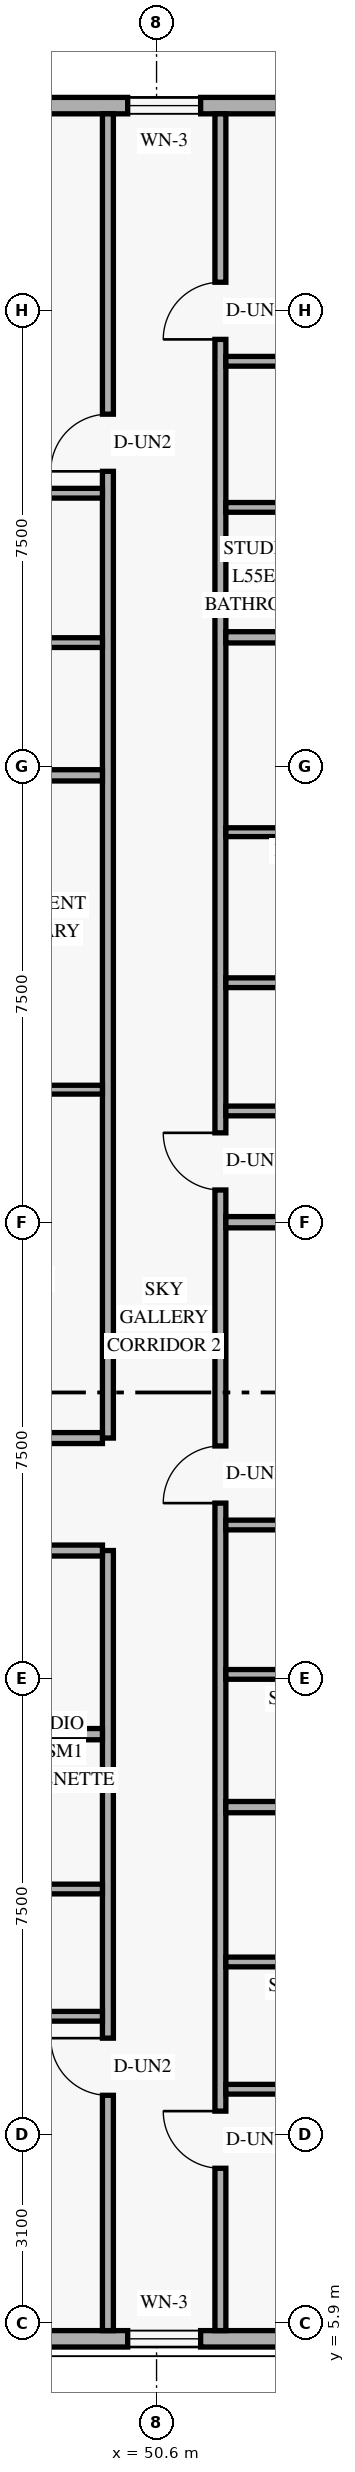
"""IFC4 building model, lengths in metres.
Left out: names, types, materials, properties, quantities, classifications, styles, units other than length and angle.
Written with IfcOpenShell. Run it as: python <this file> out.ifc"""

import sys

from ifc_helpers import new_model, si_unit, direction, frame, frame_2d, origin, place, context, subcontext, project, spatial, rectangle, extrude, element, fill, save


model = new_model("IFC4")
c1 = context("Model", 3, precision=1e-05, world=origin(), true_north=direction((0.0, 1.0)))
c2 = subcontext(c1, "Body", "Model", "MODEL_VIEW")
j1 = project(units=[si_unit("LENGTHUNIT", "METRE"), si_unit("PLANEANGLEUNIT", "RADIAN")], contexts=[c1])
p1 = place(None, origin())
s1 = spatial("IfcSite", under=j1, at=p1, CompositionType="ELEMENT")
p2 = place(p1, origin())
s2 = spatial("IfcBuilding", under=s1, at=p2, CompositionType="ELEMENT")
p3 = place(p2, frame((0.0, 0.0, 213.0)))
s3 = spatial("IfcBuildingStorey", under=s2, at=p3, CompositionType="ELEMENT", Elevation=213.0)
p4 = place(p3, frame((25.82, 5.635, 0.0), z_axis=(0.0, 0.0, 1.0), x_axis=(1.0, 0.0, 0.0)))
e1 = element("IfcWall", 1, at=p4, inside=s3, PredefinedType="SOLIDWALL", context=c2, shape_type="SweptSolid", body=[
    extrude(rectangle(XDim=32.96, YDim=0.27, at=frame_2d((16.48, 0.0))), origin(), (0.0, 0.0, 1.0), 3.36),
])
p5 = place(p4, frame((3.57, 0.0, 0.85)))
e2 = element("IfcOpeningElement", 2, at=p5, cuts=e1, PredefinedType="OPENING", context=c2, shape_type="SweptSolid", body=[
    extrude(rectangle(XDim=1.8, YDim=1.6, at=frame_2d((0.9, 0.8))), frame((0.0, 0.145, 0.0), z_axis=(0.0, -1.0, 0.0), x_axis=(1.0, 0.0, 0.0)), (0.0, 0.0, 1.0), 0.29),
])
p6 = place(p4, frame((18.725, 0.0, 0.85)))
e3 = element("IfcOpeningElement", 3, at=p6, cuts=e1, PredefinedType="OPENING", context=c2, shape_type="SweptSolid", body=[
    extrude(rectangle(XDim=1.8, YDim=1.6, at=frame_2d((0.9, 0.8))), frame((0.0, 0.145, 0.0), z_axis=(0.0, -1.0, 0.0), x_axis=(1.0, 0.0, 0.0)), (0.0, 0.0, 1.0), 0.29),
])
p7 = place(p4, frame((24.305, 0.0, 0.85)))
e4 = element("IfcOpeningElement", 4, at=p7, cuts=e1, PredefinedType="OPENING", context=c2, shape_type="SweptSolid", body=[
    extrude(rectangle(XDim=1.2, YDim=1.5, at=frame_2d((0.6, 0.75))), frame((0.0, 0.145, 0.0), z_axis=(0.0, -1.0, 0.0), x_axis=(1.0, 0.0, 0.0)), (0.0, 0.0, 1.0), 0.29),
])
p8 = place(p4, frame((30.448, 0.0, 0.85)))
e5 = element("IfcOpeningElement", 5, at=p8, cuts=e1, PredefinedType="OPENING", context=c2, shape_type="SweptSolid", body=[
    extrude(rectangle(XDim=1.8, YDim=1.6, at=frame_2d((0.9, 0.8))), frame((0.0, 0.145, 0.0), z_axis=(0.0, -1.0, 0.0), x_axis=(1.0, 0.0, 0.0)), (0.0, 0.0, 1.0), 0.29),
])
p9 = place(p3, frame((58.78, 42.365, 0.0), z_axis=(0.0, 0.0, 1.0), x_axis=(-1.0, 0.0, 0.0)))
e6 = element("IfcWall", 6, at=p9, inside=s3, PredefinedType="SOLIDWALL", context=c2, shape_type="SweptSolid", body=[
    extrude(rectangle(XDim=32.96, YDim=0.27, at=frame_2d((16.48, 0.0))), origin(), (0.0, 0.0, 1.0), 3.36),
])
p10 = place(p9, frame((27.59, 0.0, 0.85)))
e7 = element("IfcOpeningElement", 7, at=p10, cuts=e6, PredefinedType="OPENING", context=c2, shape_type="SweptSolid", body=[
    extrude(rectangle(XDim=1.8, YDim=1.6, at=frame_2d((0.9, 0.8))), frame((0.0, 0.145, 0.0), z_axis=(0.0, -1.0, 0.0), x_axis=(1.0, 0.0, 0.0)), (0.0, 0.0, 1.0), 0.29),
])
p11 = place(p9, frame((15.123, 0.0, 0.85)))
e8 = element("IfcOpeningElement", 8, at=p11, cuts=e6, PredefinedType="OPENING", context=c2, shape_type="SweptSolid", body=[
    extrude(rectangle(XDim=1.8, YDim=1.6, at=frame_2d((0.9, 0.8))), frame((0.0, 0.145, 0.0), z_axis=(0.0, -1.0, 0.0), x_axis=(1.0, 0.0, 0.0)), (0.0, 0.0, 1.0), 0.29),
])
p12 = place(p9, frame((7.455, 0.0, 0.85)))
e9 = element("IfcOpeningElement", 9, at=p12, cuts=e6, PredefinedType="OPENING", context=c2, shape_type="SweptSolid", body=[
    extrude(rectangle(XDim=1.2, YDim=1.5, at=frame_2d((0.6, 0.75))), frame((0.0, 0.145, 0.0), z_axis=(0.0, -1.0, 0.0), x_axis=(1.0, 0.0, 0.0)), (0.0, 0.0, 1.0), 0.29),
])
p13 = place(p9, frame((0.712, 0.0, 0.85)))
e10 = element("IfcOpeningElement", 10, at=p13, cuts=e6, PredefinedType="OPENING", context=c2, shape_type="SweptSolid", body=[
    extrude(rectangle(XDim=1.8, YDim=1.6, at=frame_2d((0.9, 0.8))), frame((0.0, 0.145, 0.0), z_axis=(0.0, -1.0, 0.0), x_axis=(1.0, 0.0, 0.0)), (0.0, 0.0, 1.0), 0.29),
])
p14 = place(p3, frame((49.8, 5.77, 0.0), z_axis=(0.0, 0.0, 1.0), x_axis=(0.0, 1.0, 0.0)))
e11 = element("IfcWall", 11, at=p14, inside=s3, PredefinedType="STANDARD", context=c2, shape_type="SweptSolid", body=[
    extrude(rectangle(XDim=12.83, YDim=0.18, at=frame_2d((6.415, 0.0))), origin(), (0.0, 0.0, 1.0), 2.803),
])
p15 = place(p14, frame((3.87, 0.0, 0.0)))
e12 = element("IfcOpeningElement", 12, at=p15, cuts=e11, PredefinedType="OPENING", context=c2, shape_type="SweptSolid", body=[
    extrude(rectangle(XDim=0.94, YDim=2.15, at=frame_2d((0.47, 1.075))), frame((0.0, 0.1, 0.0), z_axis=(0.0, -1.0, 0.0), x_axis=(1.0, 0.0, 0.0)), (0.0, 0.0, 1.0), 0.2),
])
p16 = place(p3, frame((49.8, 20.45, 0.0), z_axis=(0.0, 0.0, 1.0), x_axis=(0.0, 1.0, 0.0)))
e13 = element("IfcWall", 13, at=p16, inside=s3, PredefinedType="STANDARD", context=c2, shape_type="SweptSolid", body=[
    extrude(rectangle(XDim=21.78, YDim=0.18, at=frame_2d((10.89, 0.0))), origin(), (0.0, 0.0, 1.0), 2.803),
])
p17 = place(p16, frame((15.9, 0.0, 0.0)))
e14 = element("IfcOpeningElement", 14, at=p17, cuts=e13, PredefinedType="OPENING", context=c2, shape_type="SweptSolid", body=[
    extrude(rectangle(XDim=0.94, YDim=2.15, at=frame_2d((0.47, 1.075))), frame((0.0, 0.1, 0.0), z_axis=(0.0, -1.0, 0.0), x_axis=(1.0, 0.0, 0.0)), (0.0, 0.0, 1.0), 0.2),
])
p18 = place(p3, frame((37.64, 18.6, 0.0), z_axis=(0.0, 0.0, 1.0), x_axis=(1.0, 0.0, 0.0)))
e15 = element("IfcWall", 15, at=p18, inside=s3, PredefinedType="STANDARD", context=c2, shape_type="SweptSolid", body=[
    extrude(rectangle(XDim=12.07, YDim=0.18, at=frame_2d((6.035, 0.0))), origin(), (0.0, 0.0, 1.0), 2.803),
])
p19 = place(p3, frame((37.64, 20.45, 0.0), z_axis=(0.0, 0.0, 1.0), x_axis=(1.0, 0.0, 0.0)))
e16 = element("IfcWall", 16, at=p19, inside=s3, PredefinedType="STANDARD", context=c2, shape_type="SweptSolid", body=[
    extrude(rectangle(XDim=12.07, YDim=0.18, at=frame_2d((6.035, 0.0))), origin(), (0.0, 0.0, 1.0), 2.803),
])
p20 = place(p19, frame((0.32, 0.0, 0.0)))
e17 = element("IfcOpeningElement", 17, at=p20, cuts=e16, PredefinedType="OPENING", context=c2, shape_type="SweptSolid", body=[
    extrude(rectangle(XDim=0.94, YDim=2.15, at=frame_2d((0.47, 1.075))), frame((0.0, 0.1, 0.0), z_axis=(0.0, -1.0, 0.0), x_axis=(1.0, 0.0, 0.0)), (0.0, 0.0, 1.0), 0.2),
])
p21 = place(p3, frame((51.65, 5.77, 0.0), z_axis=(0.0, 0.0, 1.0), x_axis=(0.0, 1.0, 0.0)))
e18 = element("IfcWall", 18, at=p21, inside=s3, PredefinedType="STANDARD", context=c2, shape_type="SweptSolid", body=[
    extrude(rectangle(XDim=36.46, YDim=0.18, at=frame_2d((18.23, 0.0))), origin(), (0.0, 0.0, 1.0), 2.803),
])
p22 = place(p21, frame((2.67, 0.0, 0.0)))
e19 = element("IfcOpeningElement", 19, at=p22, cuts=e18, PredefinedType="OPENING", context=c2, shape_type="SweptSolid", body=[
    extrude(rectangle(XDim=0.94, YDim=2.15, at=frame_2d((0.47, 1.075))), frame((0.0, 0.1, 0.0), z_axis=(0.0, -1.0, 0.0), x_axis=(1.0, 0.0, 0.0)), (0.0, 0.0, 1.0), 0.2),
])
p23 = place(p21, frame((13.61, 0.0, 0.0)))
e20 = element("IfcOpeningElement", 20, at=p23, cuts=e18, PredefinedType="OPENING", context=c2, shape_type="SweptSolid", body=[
    extrude(rectangle(XDim=0.94, YDim=2.15, at=frame_2d((0.47, 1.075))), frame((0.0, 0.1, 0.0), z_axis=(0.0, -1.0, 0.0), x_axis=(1.0, 0.0, 0.0)), (0.0, 0.0, 1.0), 0.2),
])
p24 = place(p21, frame((18.76, 0.0, 0.0)))
e21 = element("IfcOpeningElement", 21, at=p24, cuts=e18, PredefinedType="OPENING", context=c2, shape_type="SweptSolid", body=[
    extrude(rectangle(XDim=0.94, YDim=2.15, at=frame_2d((0.47, 1.075))), frame((0.0, 0.1, 0.0), z_axis=(0.0, -1.0, 0.0), x_axis=(1.0, 0.0, 0.0)), (0.0, 0.0, 1.0), 0.2),
])
p25 = place(p21, frame((32.75, 0.0, 0.0)))
e22 = element("IfcOpeningElement", 22, at=p25, cuts=e18, PredefinedType="OPENING", context=c2, shape_type="SweptSolid", body=[
    extrude(rectangle(XDim=0.94, YDim=2.15, at=frame_2d((0.47, 1.075))), frame((0.0, 0.1, 0.0), z_axis=(0.0, -1.0, 0.0), x_axis=(1.0, 0.0, 0.0)), (0.0, 0.0, 1.0), 0.2),
])
p26 = place(p3, frame((51.74, 9.74, 0.0), z_axis=(0.0, 0.0, 1.0), x_axis=(1.0, 0.0, 0.0)))
e23 = element("IfcWall", 23, at=p26, inside=s3, PredefinedType="PLUMBINGWALL", context=c2, shape_type="SweptSolid", body=[
    extrude(rectangle(XDim=5.53, YDim=0.16, at=frame_2d((2.765, 0.0))), origin(), (0.0, 0.0, 1.0), 2.879),
])
p27 = place(p3, frame((51.74, 11.833, 0.0), z_axis=(0.0, 0.0, 1.0), x_axis=(1.0, 0.0, 0.0)))
e24 = element("IfcWall", 24, at=p27, inside=s3, PredefinedType="PLUMBINGWALL", context=c2, shape_type="SweptSolid", body=[
    extrude(rectangle(XDim=5.37, YDim=0.16, at=frame_2d((2.685, 0.0))), origin(), (0.0, 0.0, 1.0), 2.879),
])
p28 = place(p3, frame((51.74, 14.38, 0.0), z_axis=(0.0, 0.0, 1.0), x_axis=(1.0, 0.0, 0.0)))
e25 = element("IfcWall", 25, at=p28, inside=s3, PredefinedType="PARTITIONING", context=c2, shape_type="SweptSolid", body=[
    extrude(rectangle(XDim=10.39, YDim=0.185, at=frame_2d((5.195, 0.0))), origin(), (0.0, 0.0, 1.0), 2.879),
])
p29 = place(p3, frame((51.74, 19.02, 0.0), z_axis=(0.0, 0.0, 1.0), x_axis=(1.0, 0.0, 0.0)))
e26 = element("IfcWall", 26, at=p29, inside=s3, PredefinedType="PLUMBINGWALL", context=c2, shape_type="SweptSolid", body=[
    extrude(rectangle(XDim=5.53, YDim=0.16, at=frame_2d((2.765, 0.0))), origin(), (0.0, 0.0, 1.0), 2.879),
])
p30 = place(p3, frame((51.74, 16.563, 0.0), z_axis=(0.0, 0.0, 1.0), x_axis=(1.0, 0.0, 0.0)))
e27 = element("IfcWall", 27, at=p30, inside=s3, PredefinedType="PLUMBINGWALL", context=c2, shape_type="SweptSolid", body=[
    extrude(rectangle(XDim=5.37, YDim=0.16, at=frame_2d((2.685, 0.0))), origin(), (0.0, 0.0, 1.0), 2.879),
])
p31 = place(p3, frame((51.74, 24.0, 0.0), z_axis=(0.0, 0.0, 1.0), x_axis=(1.0, 0.0, 0.0)))
e28 = element("IfcWall", 28, at=p31, inside=s3, PredefinedType="PARTITIONING", context=c2, shape_type="SweptSolid", body=[
    extrude(rectangle(XDim=10.39, YDim=0.185, at=frame_2d((5.195, 0.0))), origin(), (0.0, 0.0, 1.0), 2.879),
])
p32 = place(p3, frame((51.74, 30.415, 0.0), z_axis=(0.0, 0.0, 1.0), x_axis=(1.0, 0.0, 0.0)))
e29 = element("IfcWall", 29, at=p32, inside=s3, PredefinedType="PARTITIONING", context=c2, shape_type="SweptSolid", body=[
    extrude(rectangle(XDim=10.39, YDim=0.145, at=frame_2d((5.195, 0.0))), origin(), (0.0, 0.0, 1.0), 2.879),
])
p33 = place(p32, frame((5.69, 0.0, 0.0)))
e30 = element("IfcOpeningElement", 30, at=p33, cuts=e29, PredefinedType="OPENING", context=c2, shape_type="SweptSolid", body=[
    extrude(rectangle(XDim=0.88, YDim=2.12, at=frame_2d((0.44, 1.06))), frame((0.0, 0.083, 0.0), z_axis=(0.0, -1.0, 0.0), x_axis=(1.0, 0.0, 0.0)), (0.0, 0.0, 1.0), 0.165),
])
p34 = place(p32, frame((8.265, 0.0, 0.0)))
e31 = element("IfcOpeningElement", 31, at=p34, cuts=e29, PredefinedType="OPENING", context=c2, shape_type="SweptSolid", body=[
    extrude(rectangle(XDim=0.9, YDim=2.14, at=frame_2d((0.45, 1.07))), frame((0.0, 0.083, 0.0), z_axis=(0.0, -1.0, 0.0), x_axis=(1.0, 0.0, 0.0)), (0.0, 0.0, 1.0), 0.165),
])
p35 = place(p3, frame((51.74, 25.83, 0.0), z_axis=(0.0, 0.0, 1.0), x_axis=(1.0, 0.0, 0.0)))
e32 = element("IfcWall", 32, at=p35, inside=s3, PredefinedType="PLUMBINGWALL", context=c2, shape_type="SweptSolid", body=[
    extrude(rectangle(XDim=5.53, YDim=0.16, at=frame_2d((2.765, 0.0))), origin(), (0.0, 0.0, 1.0), 2.879),
])
p36 = place(p3, frame((51.74, 27.939, 0.0), z_axis=(0.0, 0.0, 1.0), x_axis=(1.0, 0.0, 0.0)))
e33 = element("IfcWall", 33, at=p36, inside=s3, PredefinedType="PLUMBINGWALL", context=c2, shape_type="SweptSolid", body=[
    extrude(rectangle(XDim=5.37, YDim=0.16, at=frame_2d((2.685, 0.0))), origin(), (0.0, 0.0, 1.0), 2.879),
])
p37 = place(p3, frame((51.74, 33.62, 0.0), z_axis=(0.0, 0.0, 1.0), x_axis=(1.0, 0.0, 0.0)))
e34 = element("IfcWall", 34, at=p37, inside=s3, PredefinedType="PARTITIONING", context=c2, shape_type="SweptSolid", body=[
    extrude(rectangle(XDim=10.39, YDim=0.185, at=frame_2d((5.195, 0.0))), origin(), (0.0, 0.0, 1.0), 2.879),
])
p38 = place(p3, frame((51.74, 38.16, 0.0), z_axis=(0.0, 0.0, 1.0), x_axis=(1.0, 0.0, 0.0)))
e35 = element("IfcWall", 35, at=p38, inside=s3, PredefinedType="PLUMBINGWALL", context=c2, shape_type="SweptSolid", body=[
    extrude(rectangle(XDim=2.834, YDim=0.16, at=frame_2d((1.417, 0.0))), origin(), (0.0, 0.0, 1.0), 3.36),
])
p39 = place(p3, frame((51.74, 35.757, 0.0), z_axis=(0.0, 0.0, 1.0), x_axis=(1.0, 0.0, 0.0)))
e36 = element("IfcWall", 36, at=p39, inside=s3, PredefinedType="PLUMBINGWALL", context=c2, shape_type="SweptSolid", body=[
    extrude(rectangle(XDim=2.674, YDim=0.16, at=frame_2d((1.337, 0.0))), origin(), (0.0, 0.0, 1.0), 3.36),
])
p40 = place(p3, frame((38.022, 15.58, 0.0), z_axis=(0.0, 0.0, 1.0), x_axis=(1.0, 0.0, 0.0)))
e37 = element("IfcWall", 37, at=p40, inside=s3, PredefinedType="PARTITIONING", context=c2, shape_type="SweptSolid", body=[
    extrude(rectangle(XDim=11.688, YDim=0.185, at=frame_2d((5.844, 0.0))), origin(), (0.0, 0.0, 1.0), 2.803),
])
p41 = place(p3, frame((47.18, 10.94, 0.0), z_axis=(0.0, 0.0, 1.0), x_axis=(1.0, 0.0, 0.0)))
e38 = element("IfcWall", 38, at=p41, inside=s3, PredefinedType="PLUMBINGWALL", context=c2, shape_type="SweptSolid", body=[
    extrude(rectangle(XDim=2.53, YDim=0.16, at=frame_2d((1.265, 0.0))), origin(), (0.0, 0.0, 1.0), 2.803),
])
p42 = place(p3, frame((47.34, 13.033, 0.0), z_axis=(0.0, 0.0, 1.0), x_axis=(1.0, 0.0, 0.0)))
e39 = element("IfcWall", 39, at=p42, inside=s3, PredefinedType="PLUMBINGWALL", context=c2, shape_type="SweptSolid", body=[
    extrude(rectangle(XDim=2.37, YDim=0.16, at=frame_2d((1.185, 0.0))), origin(), (0.0, 0.0, 1.0), 2.803),
])
p43 = place(p3, frame((38.573, 31.35, 0.0), z_axis=(0.0, 0.0, 1.0), x_axis=(1.0, 0.0, 0.0)))
e40 = element("IfcWall", 40, at=p43, inside=s3, PredefinedType="PARTITIONING", context=c2, shape_type="SweptSolid", body=[
    extrude(rectangle(XDim=11.137, YDim=0.185, at=frame_2d((5.569, 0.0))), origin(), (0.0, 0.0, 1.0), 2.803),
])
p44 = place(p3, frame((44.89, 26.18, 0.0), z_axis=(0.0, 0.0, 1.0), x_axis=(1.0, 0.0, 0.0)))
e41 = element("IfcWall", 41, at=p44, inside=s3, PredefinedType="PARTITIONING", context=c2, shape_type="SweptSolid", body=[
    extrude(rectangle(XDim=4.82, YDim=0.145, at=frame_2d((2.41, 0.0))), origin(), (0.0, 0.0, 1.0), 2.803),
])
p45 = place(p3, frame((47.104, 35.99, 0.0), z_axis=(0.0, 0.0, 1.0), x_axis=(1.0, 0.0, 0.0)))
e42 = element("IfcWall", 42, at=p45, inside=s3, PredefinedType="PLUMBINGWALL", context=c2, shape_type="SweptSolid", body=[
    extrude(rectangle(XDim=2.606, YDim=0.16, at=frame_2d((1.303, 0.0))), origin(), (0.0, 0.0, 1.0), 2.803),
])
p46 = place(p3, frame((47.264, 33.533, 0.0), z_axis=(0.0, 0.0, 1.0), x_axis=(1.0, 0.0, 0.0)))
e43 = element("IfcWall", 43, at=p46, inside=s3, PredefinedType="PLUMBINGWALL", context=c2, shape_type="SweptSolid", body=[
    extrude(rectangle(XDim=2.446, YDim=0.16, at=frame_2d((1.223, 0.0))), origin(), (0.0, 0.0, 1.0), 2.803),
])
p47 = place(p7, origin())
e44 = element("IfcWindow", 44, at=p47, inside=s3, PartitioningType="SINGLE_PANEL", PredefinedType="WINDOW", context=c2, shape_type="SweptSolid", body=[
    extrude(rectangle(XDim=1.2, YDim=1.5, at=frame_2d((0.6, 0.75))), frame((0.0, 0.03, 0.0), z_axis=(0.0, -1.0, 0.0), x_axis=(1.0, 0.0, 0.0)), (0.0, 0.0, 1.0), 0.06),
])
fill(e4, e44)
p48 = place(p12, origin())
e45 = element("IfcWindow", 45, at=p48, inside=s3, PartitioningType="SINGLE_PANEL", PredefinedType="WINDOW", context=c2, shape_type="SweptSolid", body=[
    extrude(rectangle(XDim=1.2, YDim=1.5, at=frame_2d((0.6, 0.75))), frame((0.0, 0.03, 0.0), z_axis=(0.0, -1.0, 0.0), x_axis=(1.0, 0.0, 0.0)), (0.0, 0.0, 1.0), 0.06),
])
fill(e9, e45)
p49 = place(p22, origin())
e46 = element("IfcDoor", 46, at=p49, inside=s3, OperationType="SINGLE_SWING_RIGHT", PredefinedType="DOOR", context=c2, shape_type="SweptSolid", body=[
    extrude(rectangle(XDim=0.94, YDim=2.15, at=frame_2d((0.47, 1.075))), frame((0.0, 0.025, 0.0), z_axis=(0.0, -1.0, 0.0), x_axis=(1.0, 0.0, 0.0)), (0.0, 0.0, 1.0), 0.05),
])
fill(e19, e46)
p50 = place(p23, origin())
e47 = element("IfcDoor", 47, at=p50, inside=s3, OperationType="SINGLE_SWING_LEFT", PredefinedType="DOOR", context=c2, shape_type="SweptSolid", body=[
    extrude(rectangle(XDim=0.94, YDim=2.15, at=frame_2d((0.47, 1.075))), frame((0.0, 0.025, 0.0), z_axis=(0.0, -1.0, 0.0), x_axis=(1.0, 0.0, 0.0)), (0.0, 0.0, 1.0), 0.05),
])
fill(e20, e47)
p51 = place(p24, origin())
e48 = element("IfcDoor", 48, at=p51, inside=s3, OperationType="SINGLE_SWING_RIGHT", PredefinedType="DOOR", context=c2, shape_type="SweptSolid", body=[
    extrude(rectangle(XDim=0.94, YDim=2.15, at=frame_2d((0.47, 1.075))), frame((0.0, 0.025, 0.0), z_axis=(0.0, -1.0, 0.0), x_axis=(1.0, 0.0, 0.0)), (0.0, 0.0, 1.0), 0.05),
])
fill(e21, e48)
p52 = place(p25, origin())
e49 = element("IfcDoor", 49, at=p52, inside=s3, OperationType="SINGLE_SWING_LEFT", PredefinedType="DOOR", context=c2, shape_type="SweptSolid", body=[
    extrude(rectangle(XDim=0.94, YDim=2.15, at=frame_2d((0.47, 1.075))), frame((0.0, 0.025, 0.0), z_axis=(0.0, -1.0, 0.0), x_axis=(1.0, 0.0, 0.0)), (0.0, 0.0, 1.0), 0.05),
])
fill(e22, e49)
p53 = place(p15, origin())
e50 = element("IfcDoor", 50, at=p53, inside=s3, OperationType="SINGLE_SWING_RIGHT", PredefinedType="DOOR", context=c2, shape_type="SweptSolid", body=[
    extrude(rectangle(XDim=0.94, YDim=2.15, at=frame_2d((0.47, 1.075))), frame((0.0, 0.025, 0.0), z_axis=(0.0, -1.0, 0.0), x_axis=(1.0, 0.0, 0.0)), (0.0, 0.0, 1.0), 0.05),
])
fill(e12, e50)
p54 = place(p17, origin())
e51 = element("IfcDoor", 51, at=p54, inside=s3, OperationType="SINGLE_SWING_LEFT", PredefinedType="DOOR", context=c2, shape_type="SweptSolid", body=[
    extrude(rectangle(XDim=0.94, YDim=2.15, at=frame_2d((0.47, 1.075))), frame((0.0, 0.025, 0.0), z_axis=(0.0, -1.0, 0.0), x_axis=(1.0, 0.0, 0.0)), (0.0, 0.0, 1.0), 0.05),
])
fill(e14, e51)
save(model, sys.argv[1])
